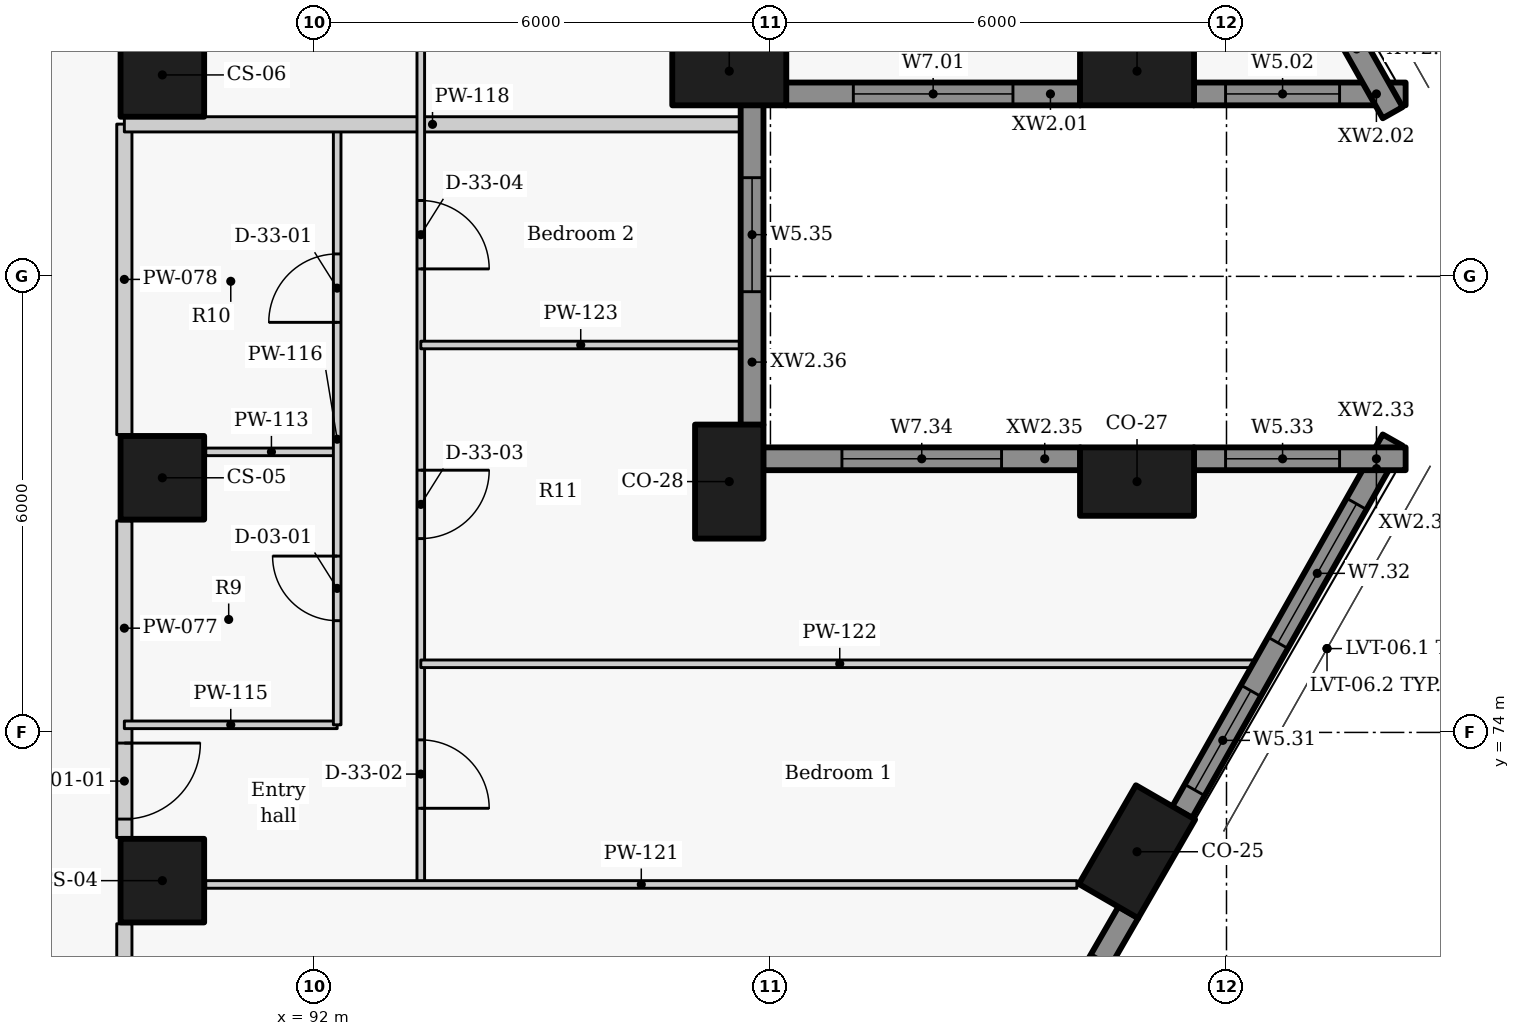
"""IFC4 building model, lengths in metres.
Left out: names, types, materials, properties, quantities, classifications, styles, units other than length and angle.
Written with IfcOpenShell. Run it as: python <this file> out.ifc"""

import sys

from ifc_helpers import new_model, si_unit, direction, frame, frame_2d, origin, origin_2d, place, context, subcontext, project, spatial, rectangle, extrude, element, fill, save


model = new_model("IFC4")
c1 = context("Model", 3, precision=1e-05, world=origin(), true_north=direction((0.0, 1.0)))
c2 = subcontext(c1, "Body", "Model", "MODEL_VIEW")
j1 = project(units=[si_unit("LENGTHUNIT", "METRE"), si_unit("PLANEANGLEUNIT", "RADIAN")], contexts=[c1])
p1 = place(None, origin())
s1 = spatial("IfcSite", under=j1, at=p1, CompositionType="ELEMENT")
p2 = place(p1, origin())
s2 = spatial("IfcBuilding", under=s1, at=p2, CompositionType="ELEMENT")
p3 = place(p2, frame((0.0, 0.0, 44.7)))
s3 = spatial("IfcBuildingStorey", under=s2, at=p3, CompositionType="ELEMENT", Elevation=44.7)
for number, where, z_axis, x_axis in (
    (1, (102.823, 72.43, 0.0), (0.0, 0.0, 1.0), (0.5, 0.866, 0.0)),
    (2, (102.823, 77.3, 0.0), (0.0, 0.0, 1.0), (-1.0, 0.0, 0.0)),
    (3, (97.458, 77.3, 0.0), (0.0, 0.0, 1.0), (0.0, 1.0, 0.0)),
    (4, (97.458, 82.7, 0.0), (0.0, 0.0, 1.0), (1.0, 0.0, 0.0)),
    (5, (102.823, 82.7, 0.0), (0.0, 0.0, 1.0), (1.0, 0.0, 0.0)),
):
    element("IfcColumn", number, at=place(p3, frame(where, z_axis=z_axis, x_axis=x_axis)), inside=s3, PredefinedType="COLUMN", context=c2, shape_type="SweptSolid", body=[
        extrude(rectangle(XDim=1.5, YDim=0.9, at=origin_2d()), origin(), (0.0, 0.0, 1.0), 3.3),
    ])
for number, where, z_axis, x_axis in (
    (6, (90.0, 72.05, 0.0), (0.0, 0.0, 1.0), (0.0, 1.0, 0.0)),
    (7, (90.0, 77.35, 0.0), (0.0, 0.0, 1.0), (0.0, 1.0, 0.0)),
    (8, (90.0, 82.65, 0.0), (0.0, 0.0, 1.0), (0.0, 1.0, 0.0)),
):
    element("IfcColumn", number, at=place(p3, frame(where, z_axis=z_axis, x_axis=x_axis)), inside=s3, PredefinedType="COLUMN", context=c2, shape_type="SweptSolid", body=[
        extrude(rectangle(XDim=1.1, YDim=1.1, at=origin_2d()), origin(), (0.0, 0.0, 1.0), 3.3),
    ])
p4 = place(p3, frame((98.204, 82.4, 0.0), z_axis=(0.0, 0.0, 1.0), x_axis=(1.0, 0.0, 0.0)))
e9 = element("IfcWall", 9, at=p4, inside=s3, PredefinedType="SOLIDWALL", context=c2, shape_type="SweptSolid", body=[
    extrude(rectangle(XDim=3.873, YDim=0.3, at=frame_2d((1.936, 0.0))), origin(), (0.0, 0.0, 1.0), 2.425),
])
p5 = place(p4, frame((0.886, 0.0, 0.9)))
e10 = element("IfcOpeningElement", 10, at=p5, cuts=e9, PredefinedType="OPENING", context=c2, shape_type="SweptSolid", body=[
    extrude(rectangle(XDim=2.1, YDim=1.1, at=frame_2d((1.05, 0.55))), frame((0.0, 0.16, 0.0), z_axis=(0.0, -1.0, 0.0), x_axis=(1.0, 0.0, 0.0)), (0.0, 0.0, 1.0), 0.32),
])
p6 = place(p3, frame((103.569, 82.4, 0.0), z_axis=(0.0, 0.0, 1.0), x_axis=(1.0, 0.0, 0.0)))
e11 = element("IfcWall", 11, at=p6, inside=s3, PredefinedType="SOLIDWALL", context=c2, shape_type="SweptSolid", body=[
    extrude(rectangle(XDim=2.788, YDim=0.3, at=frame_2d((1.394, 0.0))), origin(), (0.0, 0.0, 1.0), 2.425),
])
p7 = place(p6, frame((0.419, 0.0, 0.9)))
e12 = element("IfcOpeningElement", 12, at=p7, cuts=e11, PredefinedType="OPENING", context=c2, shape_type="SweptSolid", body=[
    extrude(rectangle(XDim=1.5, YDim=1.1, at=frame_2d((0.75, 0.55))), frame((0.0, 0.16, 0.0), z_axis=(0.0, -1.0, 0.0), x_axis=(1.0, 0.0, 0.0)), (0.0, 0.0, 1.0), 0.32),
])
p8 = place(p3, frame((106.186, 82.153, 0.0), z_axis=(0.0, 0.0, 1.0), x_axis=(-0.492363204642, 0.870389840655, 0.0)))
e13 = element("IfcWall", 13, at=p8, inside=s3, PredefinedType="SOLIDWALL", context=c2, shape_type="SweptSolid", body=[
    extrude(rectangle(XDim=5.626, YDim=0.3, at=frame_2d((2.813, 0.0))), origin(), (0.0, 0.0, 1.0), 2.425),
])
p9 = place(p8, frame((2.026, 0.0, 0.9)))
e14 = element("IfcOpeningElement", 14, at=p9, cuts=e13, PredefinedType="OPENING", context=c2, shape_type="SweptSolid", body=[
    extrude(rectangle(XDim=2.1, YDim=1.1, at=frame_2d((1.05, 0.55))), frame((0.0, 0.16, 0.0), z_axis=(0.0, -1.0, 0.0), x_axis=(1.0, 0.0, 0.0)), (0.0, 0.0, 1.0), 0.32),
])
p10 = place(p3, frame((100.941, 68.571, 0.0), z_axis=(0.0, 0.0, 1.0), x_axis=(0.499977402622, 0.866038449993, 0.0)))
e15 = element("IfcWall", 15, at=p10, inside=s3, PredefinedType="SOLIDWALL", context=c2, shape_type="SweptSolid", body=[
    extrude(rectangle(XDim=3.537, YDim=0.3, at=frame_2d((1.769, 0.0))), origin(), (0.0, 0.0, 1.0), 2.425),
])
p11 = place(p10, frame((0.719, 0.0, 0.9)))
e16 = element("IfcOpeningElement", 16, at=p11, cuts=e15, PredefinedType="OPENING", context=c2, shape_type="SweptSolid", body=[
    extrude(rectangle(XDim=2.1, YDim=1.1, at=frame_2d((1.05, 0.55))), frame((0.0, 0.16, 0.0), z_axis=(0.0, -1.0, 0.0), x_axis=(1.0, 0.0, 0.0)), (0.0, 0.0, 1.0), 0.32),
])
p12 = place(p3, frame((103.416, 72.949, 0.0), z_axis=(0.0, 0.0, 1.0), x_axis=(0.492363204642, 0.870389840655, 0.0)))
e17 = element("IfcWall", 17, at=p12, inside=s3, PredefinedType="SOLIDWALL", context=c2, shape_type="SweptSolid", body=[
    extrude(rectangle(XDim=5.626, YDim=0.3, at=frame_2d((2.813, 0.0))), origin(), (0.0, 0.0, 1.0), 2.425),
])
p13 = place(p12, frame((0.337, 0.0, 0.9)))
e18 = element("IfcOpeningElement", 18, at=p13, cuts=e17, PredefinedType="OPENING", context=c2, shape_type="SweptSolid", body=[
    extrude(rectangle(XDim=1.5, YDim=1.1, at=frame_2d((0.75, 0.55))), frame((0.0, 0.16, 0.0), z_axis=(0.0, -1.0, 0.0), x_axis=(1.0, 0.0, 0.0)), (0.0, 0.0, 1.0), 0.32),
])
p14 = place(p12, frame((2.562, 0.0, 0.9)))
e19 = element("IfcOpeningElement", 19, at=p14, cuts=e17, PredefinedType="OPENING", context=c2, shape_type="SweptSolid", body=[
    extrude(rectangle(XDim=2.1, YDim=1.1, at=frame_2d((1.05, 0.55))), frame((0.0, 0.16, 0.0), z_axis=(0.0, -1.0, 0.0), x_axis=(1.0, 0.0, 0.0)), (0.0, 0.0, 1.0), 0.32),
])
p15 = place(p3, frame((106.357, 77.6, 0.0), z_axis=(0.0, 0.0, 1.0), x_axis=(-1.0, 0.0, 0.0)))
e20 = element("IfcWall", 20, at=p15, inside=s3, PredefinedType="SOLIDWALL", context=c2, shape_type="SweptSolid", body=[
    extrude(rectangle(XDim=2.788, YDim=0.3, at=frame_2d((1.394, 0.0))), origin(), (0.0, 0.0, 1.0), 2.425),
])
p16 = place(p15, frame((0.869, 0.0, 0.9)))
e21 = element("IfcOpeningElement", 21, at=p16, cuts=e20, PredefinedType="OPENING", context=c2, shape_type="SweptSolid", body=[
    extrude(rectangle(XDim=1.5, YDim=1.1, at=frame_2d((0.75, 0.55))), frame((0.0, 0.16, 0.0), z_axis=(0.0, -1.0, 0.0), x_axis=(1.0, 0.0, 0.0)), (0.0, 0.0, 1.0), 0.32),
])
p17 = place(p3, frame((102.077, 77.6, 0.0), z_axis=(0.0, 0.0, 1.0), x_axis=(-1.0, 0.0, 0.0)))
e22 = element("IfcWall", 22, at=p17, inside=s3, PredefinedType="SOLIDWALL", context=c2, shape_type="SweptSolid", body=[
    extrude(rectangle(XDim=4.173, YDim=0.3, at=frame_2d((2.086, 0.0))), origin(), (0.0, 0.0, 1.0), 2.425),
])
p18 = place(p17, frame((1.036, 0.0, 0.9)))
e23 = element("IfcOpeningElement", 23, at=p18, cuts=e22, PredefinedType="OPENING", context=c2, shape_type="SweptSolid", body=[
    extrude(rectangle(XDim=2.1, YDim=1.1, at=frame_2d((1.05, 0.55))), frame((0.0, 0.16, 0.0), z_axis=(0.0, -1.0, 0.0), x_axis=(1.0, 0.0, 0.0)), (0.0, 0.0, 1.0), 0.32),
])
p19 = place(p3, frame((97.758, 78.046, 0.0), z_axis=(0.0, 0.0, 1.0), x_axis=(0.0, 1.0, 0.0)))
e24 = element("IfcWall", 24, at=p19, inside=s3, PredefinedType="SOLIDWALL", context=c2, shape_type="SweptSolid", body=[
    extrude(rectangle(XDim=4.208, YDim=0.3, at=frame_2d((2.104, 0.0))), origin(), (0.0, 0.0, 1.0), 2.425),
])
p20 = place(p19, frame((1.752, 0.0, 0.9)))
e25 = element("IfcOpeningElement", 25, at=p20, cuts=e24, PredefinedType="OPENING", context=c2, shape_type="SweptSolid", body=[
    extrude(rectangle(XDim=1.5, YDim=1.1, at=frame_2d((0.75, 0.55))), frame((0.0, 0.16, 0.0), z_axis=(0.0, -1.0, 0.0), x_axis=(1.0, 0.0, 0.0)), (0.0, 0.0, 1.0), 0.32),
])
p21 = place(p3, frame((89.5, 71.483, 0.0), z_axis=(0.0, 0.0, 1.0), x_axis=(0.0, -1.0, 0.0)))
e26 = element("IfcWall", 26, at=p21, inside=s3, PredefinedType="PARTITIONING", context=c2, shape_type="SweptSolid", body=[
    extrude(rectangle(XDim=3.216, YDim=0.2, at=frame_2d((1.608, 0.0))), origin(), (0.0, 0.0, 1.0), 3.025),
])
p22 = place(p21, frame((1.108, 0.0, 0.0)))
e27 = element("IfcOpeningElement", 27, at=p22, cuts=e26, PredefinedType="OPENING", context=c2, shape_type="SweptSolid", body=[
    extrude(rectangle(XDim=1.0, YDim=2.1, at=frame_2d((0.5, 1.05))), frame((0.0, 0.11, 0.0), z_axis=(0.0, -1.0, 0.0), x_axis=(1.0, 0.0, 0.0)), (0.0, 0.0, 1.0), 0.22),
])
p23 = place(p3, frame((89.5, 76.783, 0.0), z_axis=(0.0, 0.0, 1.0), x_axis=(0.0, -1.0, 0.0)))
e28 = element("IfcWall", 28, at=p23, inside=s3, PredefinedType="PARTITIONING", context=c2, shape_type="SweptSolid", body=[
    extrude(rectangle(XDim=4.166, YDim=0.2, at=frame_2d((2.083, 0.0))), origin(), (0.0, 0.0, 1.0), 3.025),
])
p24 = place(p23, frame((2.923, 0.0, 0.0)))
e29 = element("IfcOpeningElement", 29, at=p24, cuts=e28, PredefinedType="OPENING", context=c2, shape_type="SweptSolid", body=[
    extrude(rectangle(XDim=1.0, YDim=2.1, at=frame_2d((0.5, 1.05))), frame((0.0, 0.11, 0.0), z_axis=(0.0, -1.0, 0.0), x_axis=(1.0, 0.0, 0.0)), (0.0, 0.0, 1.0), 0.22),
])
p25 = place(p3, frame((89.5, 77.917, 0.0), z_axis=(0.0, 0.0, 1.0), x_axis=(0.0, 1.0, 0.0)))
e30 = element("IfcWall", 30, at=p25, inside=s3, PredefinedType="PARTITIONING", context=c2, shape_type="SweptSolid", body=[
    extrude(rectangle(XDim=4.086, YDim=0.2, at=frame_2d((2.043, 0.0))), origin(), (0.0, 0.0, 1.0), 3.025),
])
p26 = place(p3, frame((90.57, 77.691, 0.0), z_axis=(0.0, 0.0, 1.0), x_axis=(1.0, 0.0, 0.0)))
e31 = element("IfcWall", 31, at=p26, inside=s3, PredefinedType="PARTITIONING", context=c2, shape_type="SweptSolid", body=[
    extrude(rectangle(XDim=1.73, YDim=0.1, at=frame_2d((0.865, 0.0))), origin(), (0.0, 0.0, 1.0), 3.025),
])
p27 = place(p3, frame((89.5, 74.1, 0.0), z_axis=(0.0, 0.0, 1.0), x_axis=(1.0, 0.0, 0.0)))
e32 = element("IfcWall", 32, at=p27, inside=s3, PredefinedType="PARTITIONING", context=c2, shape_type="SweptSolid", body=[
    extrude(rectangle(XDim=2.8, YDim=0.1, at=frame_2d((1.4, 0.0))), origin(), (0.0, 0.0, 1.0), 2.505),
])
p28 = place(p3, frame((92.3, 74.1, 0.0), z_axis=(0.0, 0.0, 1.0), x_axis=(0.0, 1.0, 0.0)))
e33 = element("IfcWall", 33, at=p28, inside=s3, PredefinedType="PARTITIONING", context=c2, shape_type="SweptSolid", body=[
    extrude(rectangle(XDim=7.9, YDim=0.1, at=frame_2d((3.95, 0.0))), origin(), (0.0, 0.0, 1.0), 3.025),
])
p29 = place(p28, frame((1.37, 0.0, 0.0)))
e34 = element("IfcOpeningElement", 34, at=p29, cuts=e33, PredefinedType="OPENING", context=c2, shape_type="SweptSolid", body=[
    extrude(rectangle(XDim=0.85, YDim=2.1, at=frame_2d((0.425, 1.05))), frame((0.0, 0.06, 0.0), z_axis=(0.0, -1.0, 0.0), x_axis=(1.0, 0.0, 0.0)), (0.0, 0.0, 1.0), 0.12),
])
p30 = place(p28, frame((5.295, 0.0, 0.0)))
e35 = element("IfcOpeningElement", 35, at=p30, cuts=e33, PredefinedType="OPENING", context=c2, shape_type="SweptSolid", body=[
    extrude(rectangle(XDim=0.9, YDim=2.1, at=frame_2d((0.45, 1.05))), frame((0.0, 0.06, 0.0), z_axis=(0.0, -1.0, 0.0), x_axis=(1.0, 0.0, 0.0)), (0.0, 0.0, 1.0), 0.12),
])
p31 = place(p3, frame((89.5, 82.0, 0.0), z_axis=(0.0, 0.0, 1.0), x_axis=(1.0, 0.0, 0.0)))
e36 = element("IfcWall", 36, at=p31, inside=s3, PredefinedType="PARTITIONING", context=c2, shape_type="SweptSolid", body=[
    extrude(rectangle(XDim=8.108, YDim=0.2, at=frame_2d((4.054, 0.0))), origin(), (0.0, 0.0, 1.0), 2.405),
])
p32 = place(p3, frame((93.4, 90.0, 0.0), z_axis=(0.0, 0.0, 1.0), x_axis=(0.0, -1.0, 0.0)))
e37 = element("IfcWall", 37, at=p32, inside=s3, PredefinedType="PARTITIONING", context=c2, shape_type="SweptSolid", body=[
    extrude(rectangle(XDim=18.0, YDim=0.1, at=frame_2d((9.0, 0.0))), origin(), (0.0, 0.0, 1.0), 3.025),
])
p33 = place(p32, frame((16.098, 0.0, 0.0)))
e38 = element("IfcOpeningElement", 38, at=p33, cuts=e37, PredefinedType="OPENING", context=c2, shape_type="SweptSolid", body=[
    extrude(rectangle(XDim=0.9, YDim=2.1, at=frame_2d((0.45, 1.05))), frame((0.0, 0.06, 0.0), z_axis=(0.0, -1.0, 0.0), x_axis=(1.0, 0.0, 0.0)), (0.0, 0.0, 1.0), 0.12),
])
p34 = place(p32, frame((12.55, 0.0, 0.0)))
e39 = element("IfcOpeningElement", 39, at=p34, cuts=e37, PredefinedType="OPENING", context=c2, shape_type="SweptSolid", body=[
    extrude(rectangle(XDim=0.9, YDim=2.1, at=frame_2d((0.45, 1.05))), frame((0.0, 0.06, 0.0), z_axis=(0.0, -1.0, 0.0), x_axis=(1.0, 0.0, 0.0)), (0.0, 0.0, 1.0), 0.12),
])
p35 = place(p32, frame((9.002, 0.0, 0.0)))
e40 = element("IfcOpeningElement", 40, at=p35, cuts=e37, PredefinedType="OPENING", context=c2, shape_type="SweptSolid", body=[
    extrude(rectangle(XDim=0.9, YDim=2.1, at=frame_2d((0.45, 1.05))), frame((0.0, 0.06, 0.0), z_axis=(0.0, -1.0, 0.0), x_axis=(1.0, 0.0, 0.0)), (0.0, 0.0, 1.0), 0.12),
])
p36 = place(p32, frame((3.55, 0.0, 0.0)))
e41 = element("IfcOpeningElement", 41, at=p36, cuts=e37, PredefinedType="OPENING", context=c2, shape_type="SweptSolid", body=[
    extrude(rectangle(XDim=0.9, YDim=2.1, at=frame_2d((0.45, 1.05))), frame((0.0, 0.06, 0.0), z_axis=(0.0, -1.0, 0.0), x_axis=(1.0, 0.0, 0.0)), (0.0, 0.0, 1.0), 0.12),
])
p37 = place(p3, frame((90.57, 72.0, 0.0), z_axis=(0.0, 0.0, 1.0), x_axis=(1.0, 0.0, 0.0)))
e42 = element("IfcWall", 42, at=p37, inside=s3, PredefinedType="PARTITIONING", context=c2, shape_type="SweptSolid", body=[
    extrude(rectangle(XDim=11.462, YDim=0.1, at=frame_2d((5.731, 0.0))), origin(), (0.0, 0.0, 1.0), 3.025),
])
p38 = place(p3, frame((93.4, 74.903, 0.0), z_axis=(0.0, 0.0, 1.0), x_axis=(1.0, 0.0, 0.0)))
e43 = element("IfcWall", 43, at=p38, inside=s3, PredefinedType="PARTITIONING", context=c2, shape_type="SweptSolid", body=[
    extrude(rectangle(XDim=11.024, YDim=0.1, at=frame_2d((5.512, 0.0))), origin(), (0.0, 0.0, 1.0), 2.405),
])
p39 = place(p3, frame((93.4, 79.097, 0.0), z_axis=(0.0, 0.0, 1.0), x_axis=(1.0, 0.0, 0.0)))
e44 = element("IfcWall", 44, at=p39, inside=s3, PredefinedType="PARTITIONING", context=c2, shape_type="SweptSolid", body=[
    extrude(rectangle(XDim=4.208, YDim=0.1, at=frame_2d((2.104, 0.0))), origin(), (0.0, 0.0, 1.0), 2.405),
])
p40 = place(p5, origin())
e45 = element("IfcWindow", 45, at=p40, inside=s3, PartitioningType="SINGLE_PANEL", PredefinedType="WINDOW", context=c2, shape_type="SweptSolid", body=[
    extrude(rectangle(XDim=2.1, YDim=1.1, at=frame_2d((1.05, 0.55))), frame((0.0, 0.03, 0.0), z_axis=(0.0, -1.0, 0.0), x_axis=(1.0, 0.0, 0.0)), (0.0, 0.0, 1.0), 0.06),
])
fill(e10, e45)
p41 = place(p7, origin())
e46 = element("IfcWindow", 46, at=p41, inside=s3, PartitioningType="SINGLE_PANEL", PredefinedType="WINDOW", context=c2, shape_type="SweptSolid", body=[
    extrude(rectangle(XDim=1.5, YDim=1.1, at=frame_2d((0.75, 0.55))), frame((0.0, 0.03, 0.0), z_axis=(0.0, -1.0, 0.0), x_axis=(1.0, 0.0, 0.0)), (0.0, 0.0, 1.0), 0.06),
])
fill(e12, e46)
p42 = place(p13, origin())
e47 = element("IfcWindow", 47, at=p42, inside=s3, PartitioningType="SINGLE_PANEL", PredefinedType="WINDOW", context=c2, shape_type="SweptSolid", body=[
    extrude(rectangle(XDim=1.5, YDim=1.1, at=frame_2d((0.75, 0.55))), frame((0.0, 0.03, 0.0), z_axis=(0.0, -1.0, 0.0), x_axis=(1.0, 0.0, 0.0)), (0.0, 0.0, 1.0), 0.06),
])
fill(e18, e47)
p43 = place(p14, origin())
e48 = element("IfcWindow", 48, at=p43, inside=s3, PartitioningType="SINGLE_PANEL", PredefinedType="WINDOW", context=c2, shape_type="SweptSolid", body=[
    extrude(rectangle(XDim=2.1, YDim=1.1, at=frame_2d((1.05, 0.55))), frame((0.0, 0.03, 0.0), z_axis=(0.0, -1.0, 0.0), x_axis=(1.0, 0.0, 0.0)), (0.0, 0.0, 1.0), 0.06),
])
fill(e19, e48)
p44 = place(p16, origin())
e49 = element("IfcWindow", 49, at=p44, inside=s3, PartitioningType="SINGLE_PANEL", PredefinedType="WINDOW", context=c2, shape_type="SweptSolid", body=[
    extrude(rectangle(XDim=1.5, YDim=1.1, at=frame_2d((0.75, 0.55))), frame((0.0, 0.03, 0.0), z_axis=(0.0, -1.0, 0.0), x_axis=(1.0, 0.0, 0.0)), (0.0, 0.0, 1.0), 0.06),
])
fill(e21, e49)
p45 = place(p18, origin())
e50 = element("IfcWindow", 50, at=p45, inside=s3, PartitioningType="SINGLE_PANEL", PredefinedType="WINDOW", context=c2, shape_type="SweptSolid", body=[
    extrude(rectangle(XDim=2.1, YDim=1.1, at=frame_2d((1.05, 0.55))), frame((0.0, 0.03, 0.0), z_axis=(0.0, -1.0, 0.0), x_axis=(1.0, 0.0, 0.0)), (0.0, 0.0, 1.0), 0.06),
])
fill(e23, e50)
p46 = place(p20, origin())
e51 = element("IfcWindow", 51, at=p46, inside=s3, PartitioningType="SINGLE_PANEL", PredefinedType="WINDOW", context=c2, shape_type="SweptSolid", body=[
    extrude(rectangle(XDim=1.5, YDim=1.1, at=frame_2d((0.75, 0.55))), frame((0.0, 0.03, 0.0), z_axis=(0.0, -1.0, 0.0), x_axis=(1.0, 0.0, 0.0)), (0.0, 0.0, 1.0), 0.06),
])
fill(e25, e51)
p47 = place(p24, origin())
e52 = element("IfcDoor", 52, at=p47, inside=s3, OperationType="SINGLE_SWING_LEFT", PredefinedType="DOOR", context=c2, shape_type="SweptSolid", body=[
    extrude(rectangle(XDim=1.0, YDim=2.1, at=frame_2d((0.5, 1.05))), frame((0.0, 0.025, 0.0), z_axis=(0.0, -1.0, 0.0), x_axis=(1.0, 0.0, 0.0)), (0.0, 0.0, 1.0), 0.05),
])
fill(e29, e52)
p48 = place(p29, origin())
e53 = element("IfcDoor", 53, at=p48, inside=s3, OperationType="SINGLE_SWING_RIGHT", PredefinedType="DOOR", context=c2, shape_type="SweptSolid", body=[
    extrude(rectangle(XDim=0.85, YDim=2.1, at=frame_2d((0.425, 1.05))), frame((0.0, 0.025, 0.0), z_axis=(0.0, -1.0, 0.0), x_axis=(1.0, 0.0, 0.0)), (0.0, 0.0, 1.0), 0.05),
])
fill(e34, e53)
p49 = place(p30, origin())
e54 = element("IfcDoor", 54, at=p49, inside=s3, OperationType="SINGLE_SWING_LEFT", PredefinedType="DOOR", context=c2, shape_type="SweptSolid", body=[
    extrude(rectangle(XDim=0.9, YDim=2.1, at=frame_2d((0.45, 1.05))), frame((0.0, 0.025, 0.0), z_axis=(0.0, -1.0, 0.0), x_axis=(1.0, 0.0, 0.0)), (0.0, 0.0, 1.0), 0.05),
])
fill(e35, e54)
p50 = place(p33, origin())
e55 = element("IfcDoor", 55, at=p50, inside=s3, OperationType="SINGLE_SWING_RIGHT", PredefinedType="DOOR", context=c2, shape_type="SweptSolid", body=[
    extrude(rectangle(XDim=0.9, YDim=2.1, at=frame_2d((0.45, 1.05))), frame((0.0, 0.025, 0.0), z_axis=(0.0, -1.0, 0.0), x_axis=(1.0, 0.0, 0.0)), (0.0, 0.0, 1.0), 0.05),
])
fill(e38, e55)
p51 = place(p34, origin())
e56 = element("IfcDoor", 56, at=p51, inside=s3, OperationType="SINGLE_SWING_LEFT", PredefinedType="DOOR", context=c2, shape_type="SweptSolid", body=[
    extrude(rectangle(XDim=0.9, YDim=2.1, at=frame_2d((0.45, 1.05))), frame((0.0, 0.025, 0.0), z_axis=(0.0, -1.0, 0.0), x_axis=(1.0, 0.0, 0.0)), (0.0, 0.0, 1.0), 0.05),
])
fill(e39, e56)
p52 = place(p35, origin())
e57 = element("IfcDoor", 57, at=p52, inside=s3, OperationType="SINGLE_SWING_RIGHT", PredefinedType="DOOR", context=c2, shape_type="SweptSolid", body=[
    extrude(rectangle(XDim=0.9, YDim=2.1, at=frame_2d((0.45, 1.05))), frame((0.0, 0.025, 0.0), z_axis=(0.0, -1.0, 0.0), x_axis=(1.0, 0.0, 0.0)), (0.0, 0.0, 1.0), 0.05),
])
fill(e40, e57)
save(model, sys.argv[1])
